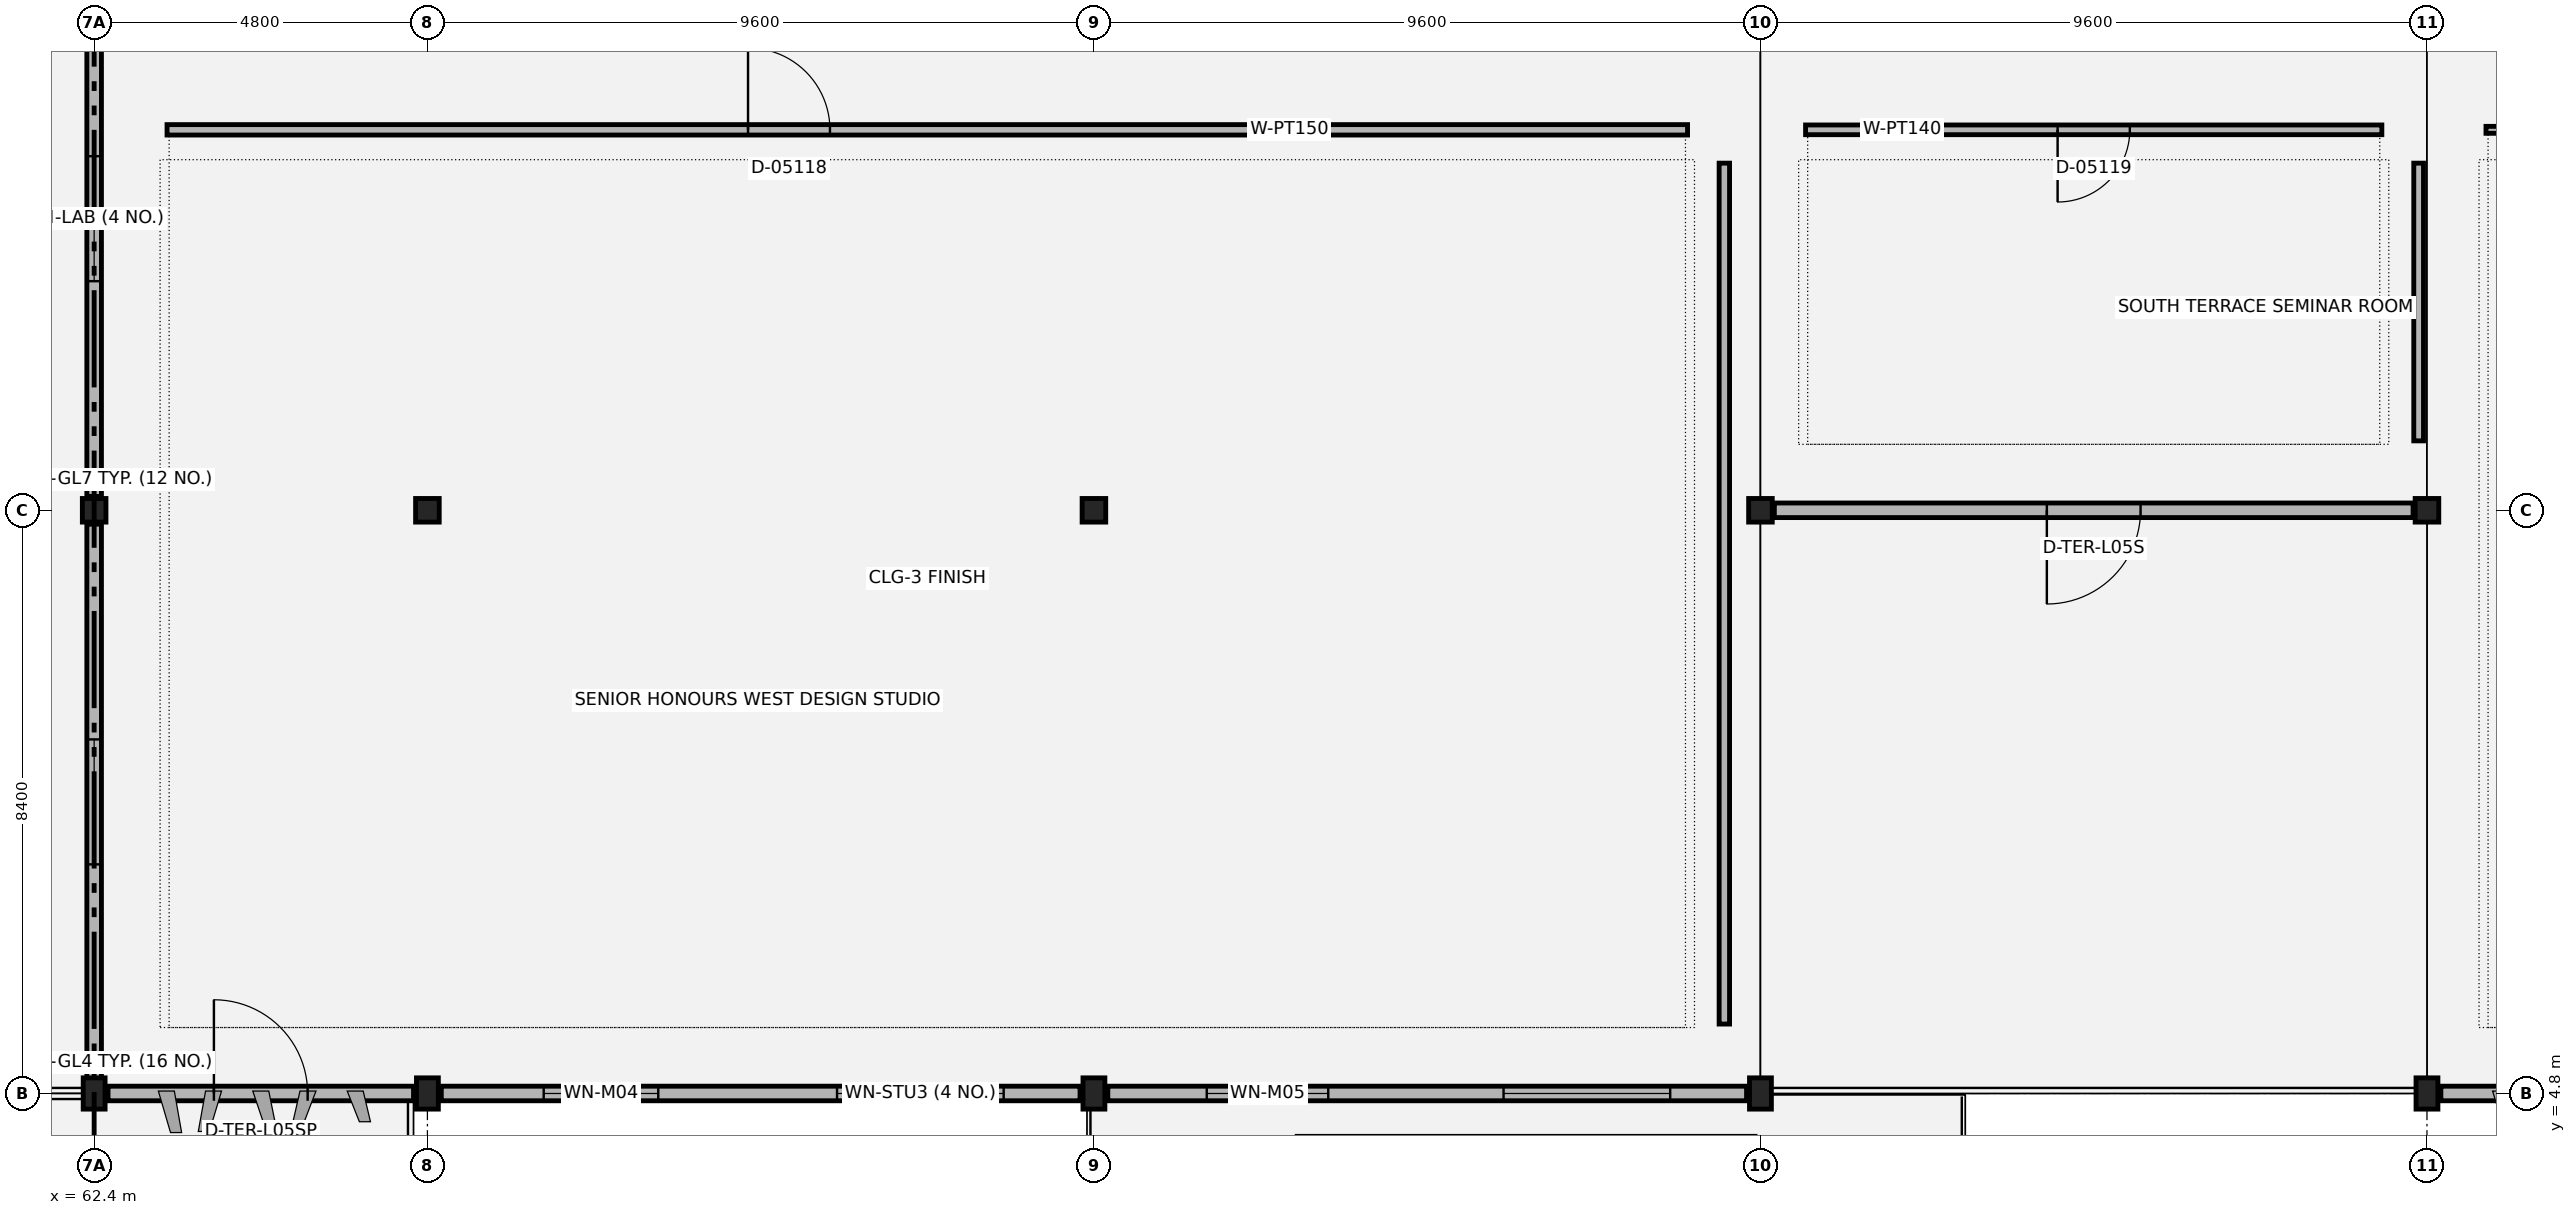
"""IFC4 building model, lengths in metres.
Left out: names, types, materials, properties, quantities, classifications, styles, units other than length and angle.
Written with IfcOpenShell. Run it as: python <this file> out.ifc"""

import sys

from ifc_helpers import new_model, si_unit, direction, frame, frame_2d, origin, origin_2d, place, context, subcontext, project, spatial, rectangle, extrude, element, fill, save


model = new_model("IFC4")
c1 = context("Model", 3, precision=1e-05, world=origin(), true_north=direction((0.0, 1.0)))
c2 = subcontext(c1, "Body", "Model", "MODEL_VIEW")
j1 = project(units=[si_unit("LENGTHUNIT", "METRE"), si_unit("PLANEANGLEUNIT", "RADIAN")], contexts=[c1])
p1 = place(None, origin())
s1 = spatial("IfcSite", under=j1, at=p1, CompositionType="ELEMENT")
p2 = place(p1, origin())
s2 = spatial("IfcBuilding", under=s1, at=p2, CompositionType="ELEMENT")
p3 = place(p2, frame((0.0, 0.0, 22.8)))
s3 = spatial("IfcBuildingStorey", under=s2, at=p3, CompositionType="ELEMENT", Elevation=22.8)
p4 = place(p3, frame((62.4, 4.8, 0.0), z_axis=(0.0, 0.0, 1.0), x_axis=(1.0, 0.0, 0.0)))
e1 = element("IfcColumn", 1, at=p4, inside=s3, PredefinedType="COLUMN", context=c2, shape_type="SweptSolid", body=[
    extrude(rectangle(XDim=0.315, YDim=0.45, at=origin_2d()), origin(), (0.0, 0.0, 1.0), 4.2),
])
p5 = place(p3, frame((62.4, 13.2, 0.0), z_axis=(0.0, 0.0, 1.0), x_axis=(1.0, 0.0, 0.0)))
e2 = element("IfcColumn", 2, at=p5, inside=s3, PredefinedType="COLUMN", context=c2, shape_type="SweptSolid", body=[
    extrude(rectangle(XDim=0.34, YDim=0.34, at=origin_2d()), origin(), (0.0, 0.0, 1.0), 4.2),
])
p6 = place(p3, frame((67.2, 4.8, 0.0), z_axis=(0.0, 0.0, 1.0), x_axis=(1.0, 0.0, 0.0)))
e3 = element("IfcColumn", 3, at=p6, inside=s3, PredefinedType="COLUMN", context=c2, shape_type="SweptSolid", body=[
    extrude(rectangle(XDim=0.315, YDim=0.45, at=origin_2d()), origin(), (0.0, 0.0, 1.0), 4.2),
])
p7 = place(p3, frame((67.2, 13.2, 0.0), z_axis=(0.0, 0.0, 1.0), x_axis=(1.0, 0.0, 0.0)))
e4 = element("IfcColumn", 4, at=p7, inside=s3, PredefinedType="COLUMN", context=c2, shape_type="SweptSolid", body=[
    extrude(rectangle(XDim=0.34, YDim=0.34, at=origin_2d()), origin(), (0.0, 0.0, 1.0), 4.2),
])
p8 = place(p3, frame((76.8, 4.8, 0.0), z_axis=(0.0, 0.0, 1.0), x_axis=(1.0, 0.0, 0.0)))
e5 = element("IfcColumn", 5, at=p8, inside=s3, PredefinedType="COLUMN", context=c2, shape_type="SweptSolid", body=[
    extrude(rectangle(XDim=0.315, YDim=0.45, at=origin_2d()), origin(), (0.0, 0.0, 1.0), 4.2),
])
p9 = place(p3, frame((76.8, 13.2, 0.0), z_axis=(0.0, 0.0, 1.0), x_axis=(1.0, 0.0, 0.0)))
e6 = element("IfcColumn", 6, at=p9, inside=s3, PredefinedType="COLUMN", context=c2, shape_type="SweptSolid", body=[
    extrude(rectangle(XDim=0.34, YDim=0.34, at=origin_2d()), origin(), (0.0, 0.0, 1.0), 4.2),
])
p10 = place(p3, frame((86.4, 4.8, 0.0), z_axis=(0.0, 0.0, 1.0), x_axis=(1.0, 0.0, 0.0)))
e7 = element("IfcColumn", 7, at=p10, inside=s3, PredefinedType="COLUMN", context=c2, shape_type="SweptSolid", body=[
    extrude(rectangle(XDim=0.315, YDim=0.45, at=origin_2d()), origin(), (0.0, 0.0, 1.0), 4.2),
])
p11 = place(p3, frame((86.4, 13.2, 0.0), z_axis=(0.0, 0.0, 1.0), x_axis=(1.0, 0.0, 0.0)))
e8 = element("IfcColumn", 8, at=p11, inside=s3, PredefinedType="COLUMN", context=c2, shape_type="SweptSolid", body=[
    extrude(rectangle(XDim=0.34, YDim=0.34, at=origin_2d()), origin(), (0.0, 0.0, 1.0), 4.2),
])
p12 = place(p3, frame((96.0, 4.8, 0.0), z_axis=(0.0, 0.0, 1.0), x_axis=(1.0, 0.0, 0.0)))
e9 = element("IfcColumn", 9, at=p12, inside=s3, PredefinedType="COLUMN", context=c2, shape_type="SweptSolid", body=[
    extrude(rectangle(XDim=0.315, YDim=0.45, at=origin_2d()), origin(), (0.0, 0.0, 1.0), 4.2),
])
p13 = place(p3, frame((96.0, 13.2, 0.0), z_axis=(0.0, 0.0, 1.0), x_axis=(1.0, 0.0, 0.0)))
e10 = element("IfcColumn", 10, at=p13, inside=s3, PredefinedType="COLUMN", context=c2, shape_type="SweptSolid", body=[
    extrude(rectangle(XDim=0.34, YDim=0.34, at=origin_2d()), origin(), (0.0, 0.0, 1.0), 4.2),
])
p14 = place(p3, frame((62.6, 4.8, 0.0), z_axis=(0.0, 0.0, 1.0), x_axis=(1.0, 0.0, 0.0)))
e11 = element("IfcWall", 11, at=p14, inside=s3, PredefinedType="SOLIDWALL", context=c2, shape_type="SweptSolid", body=[
    extrude(rectangle(XDim=4.4, YDim=0.21, at=frame_2d((2.2, 0.0))), origin(), (0.0, 0.0, 1.0), 3.07),
])
p15 = place(p14, frame((1.525, 0.0, 0.0)))
e12 = element("IfcOpeningElement", 12, at=p15, cuts=e11, PredefinedType="OPENING", context=c2, shape_type="SweptSolid", body=[
    extrude(rectangle(XDim=1.35, YDim=2.15, at=frame_2d((0.675, 1.075))), frame((0.0, 0.115, 0.0), z_axis=(0.0, -1.0, 0.0), x_axis=(1.0, 0.0, 0.0)), (0.0, 0.0, 1.0), 0.23),
])
p16 = place(p3, frame((67.4, 4.8, 0.0), z_axis=(0.0, 0.0, 1.0), x_axis=(1.0, 0.0, 0.0)))
e13 = element("IfcWall", 13, at=p16, inside=s3, PredefinedType="SOLIDWALL", context=c2, shape_type="SweptSolid", body=[
    extrude(rectangle(XDim=9.2, YDim=0.21, at=frame_2d((4.6, 0.0))), origin(), (0.0, 0.0, 1.0), 3.07),
])
p17 = place(p16, frame((1.475, 0.0, 0.9)))
e14 = element("IfcOpeningElement", 14, at=p17, cuts=e13, PredefinedType="OPENING", context=c2, shape_type="SweptSolid", body=[
    extrude(rectangle(XDim=1.65, YDim=1.5, at=frame_2d((0.825, 0.75))), frame((0.0, 0.115, 0.0), z_axis=(0.0, -1.0, 0.0), x_axis=(1.0, 0.0, 0.0)), (0.0, 0.0, 1.0), 0.23),
])
p18 = place(p16, frame((5.7, 0.0, 0.9)))
e15 = element("IfcOpeningElement", 15, at=p18, cuts=e13, PredefinedType="OPENING", context=c2, shape_type="SweptSolid", body=[
    extrude(rectangle(XDim=2.4, YDim=1.6, at=frame_2d((1.2, 0.8))), frame((0.0, 0.115, 0.0), z_axis=(0.0, -1.0, 0.0), x_axis=(1.0, 0.0, 0.0)), (0.0, 0.0, 1.0), 0.23),
])
p19 = place(p3, frame((77.0, 4.8, 0.0), z_axis=(0.0, 0.0, 1.0), x_axis=(1.0, 0.0, 0.0)))
e16 = element("IfcWall", 16, at=p19, inside=s3, PredefinedType="SOLIDWALL", context=c2, shape_type="SweptSolid", body=[
    extrude(rectangle(XDim=9.2, YDim=0.21, at=frame_2d((4.6, 0.0))), origin(), (0.0, 0.0, 1.0), 3.07),
])
p20 = place(p19, frame((1.425, 0.0, 0.9)))
e17 = element("IfcOpeningElement", 17, at=p20, cuts=e16, PredefinedType="OPENING", context=c2, shape_type="SweptSolid", body=[
    extrude(rectangle(XDim=1.75, YDim=1.55, at=frame_2d((0.875, 0.775))), frame((0.0, 0.115, 0.0), z_axis=(0.0, -1.0, 0.0), x_axis=(1.0, 0.0, 0.0)), (0.0, 0.0, 1.0), 0.23),
])
p21 = place(p19, frame((5.7, 0.0, 0.9)))
e18 = element("IfcOpeningElement", 18, at=p21, cuts=e16, PredefinedType="OPENING", context=c2, shape_type="SweptSolid", body=[
    extrude(rectangle(XDim=2.4, YDim=1.6, at=frame_2d((1.2, 0.8))), frame((0.0, 0.115, 0.0), z_axis=(0.0, -1.0, 0.0), x_axis=(1.0, 0.0, 0.0)), (0.0, 0.0, 1.0), 0.23),
])
p22 = place(p3, frame((96.2, 4.8, 0.0), z_axis=(0.0, 0.0, 1.0), x_axis=(1.0, 0.0, 0.0)))
e19 = element("IfcWall", 19, at=p22, inside=s3, PredefinedType="SOLIDWALL", context=c2, shape_type="SweptSolid", body=[
    extrude(rectangle(XDim=9.2, YDim=0.21, at=frame_2d((4.6, 0.0))), origin(), (0.0, 0.0, 1.0), 3.07),
])
p23 = place(p22, frame((1.375, 0.0, 0.9)))
e20 = element("IfcOpeningElement", 20, at=p23, cuts=e19, PredefinedType="OPENING", context=c2, shape_type="SweptSolid", body=[
    extrude(rectangle(XDim=1.85, YDim=1.55, at=frame_2d((0.925, 0.775))), frame((0.0, 0.115, 0.0), z_axis=(0.0, -1.0, 0.0), x_axis=(1.0, 0.0, 0.0)), (0.0, 0.0, 1.0), 0.23),
])
p24 = place(p22, frame((5.7, 0.0, 0.9)))
e21 = element("IfcOpeningElement", 21, at=p24, cuts=e19, PredefinedType="OPENING", context=c2, shape_type="SweptSolid", body=[
    extrude(rectangle(XDim=2.4, YDim=1.6, at=frame_2d((1.2, 0.8))), frame((0.0, 0.115, 0.0), z_axis=(0.0, -1.0, 0.0), x_axis=(1.0, 0.0, 0.0)), (0.0, 0.0, 1.0), 0.23),
])
p25 = place(p3, frame((62.4, 21.4, 0.0), z_axis=(0.0, 0.0, 1.0), x_axis=(0.0, -1.0, 0.0)))
e22 = element("IfcWall", 22, at=p25, inside=s3, PredefinedType="SOLIDWALL", context=c2, shape_type="SweptSolid", body=[
    extrude(rectangle(XDim=8.0, YDim=0.21, at=frame_2d((4.0, 0.0))), origin(), (0.0, 0.0, 1.0), 3.07),
])
p26 = place(p25, frame((3.1, 0.0, 0.9)))
e23 = element("IfcOpeningElement", 23, at=p26, cuts=e22, PredefinedType="OPENING", context=c2, shape_type="SweptSolid", body=[
    extrude(rectangle(XDim=1.8, YDim=1.5, at=frame_2d((0.9, 0.75))), frame((0.0, 0.115, 0.0), z_axis=(0.0, -1.0, 0.0), x_axis=(1.0, 0.0, 0.0)), (0.0, 0.0, 1.0), 0.23),
])
p27 = place(p3, frame((62.4, 13.0, 0.0), z_axis=(0.0, 0.0, 1.0), x_axis=(0.0, -1.0, 0.0)))
e24 = element("IfcWall", 24, at=p27, inside=s3, PredefinedType="SOLIDWALL", context=c2, shape_type="SweptSolid", body=[
    extrude(rectangle(XDim=8.0, YDim=0.21, at=frame_2d((4.0, 0.0))), origin(), (0.0, 0.0, 1.0), 3.07),
])
p28 = place(p27, frame((3.1, 0.0, 0.9)))
e25 = element("IfcOpeningElement", 25, at=p28, cuts=e24, PredefinedType="OPENING", context=c2, shape_type="SweptSolid", body=[
    extrude(rectangle(XDim=1.8, YDim=1.5, at=frame_2d((0.9, 0.75))), frame((0.0, 0.115, 0.0), z_axis=(0.0, -1.0, 0.0), x_axis=(1.0, 0.0, 0.0)), (0.0, 0.0, 1.0), 0.23),
])
p29 = place(p3, frame((86.6, 13.2, 0.0), z_axis=(0.0, 0.0, 1.0), x_axis=(1.0, 0.0, 0.0)))
e26 = element("IfcWall", 26, at=p29, inside=s3, PredefinedType="SOLIDWALL", context=c2, shape_type="SweptSolid", body=[
    extrude(rectangle(XDim=9.2, YDim=0.21, at=frame_2d((4.6, 0.0))), origin(), (0.0, 0.0, 1.0), 3.07),
])
p30 = place(p29, frame((3.925, 0.0, 0.0)))
e27 = element("IfcOpeningElement", 27, at=p30, cuts=e26, PredefinedType="OPENING", context=c2, shape_type="SweptSolid", body=[
    extrude(rectangle(XDim=1.35, YDim=2.15, at=frame_2d((0.675, 1.075))), frame((0.0, 0.115, 0.0), z_axis=(0.0, -1.0, 0.0), x_axis=(1.0, 0.0, 0.0)), (0.0, 0.0, 1.0), 0.23),
])
p31 = place(p3, frame((63.45, 18.68, 0.0), z_axis=(0.0, 0.0, 1.0), x_axis=(1.0, 0.0, 0.0)))
e28 = element("IfcWall", 28, at=p31, inside=s3, PredefinedType="PARTITIONING", context=c2, shape_type="SweptSolid", body=[
    extrude(rectangle(XDim=21.9, YDim=0.15, at=frame_2d((10.95, 0.0))), origin(), (0.0, 0.0, 1.0), 3.05),
])
p32 = place(p31, frame((8.368, 0.0, 0.0)))
e29 = element("IfcOpeningElement", 29, at=p32, cuts=e28, PredefinedType="OPENING", context=c2, shape_type="SweptSolid", body=[
    extrude(rectangle(XDim=1.18, YDim=2.15, at=frame_2d((0.59, 1.075))), frame((0.0, 0.085, 0.0), z_axis=(0.0, -1.0, 0.0), x_axis=(1.0, 0.0, 0.0)), (0.0, 0.0, 1.0), 0.17),
])
p33 = place(p3, frame((85.88, 5.8, 0.0), z_axis=(0.0, 0.0, 1.0), x_axis=(0.0, 1.0, 0.0)))
e30 = element("IfcWall", 30, at=p33, inside=s3, PredefinedType="PARTITIONING", context=c2, shape_type="SweptSolid", body=[
    extrude(rectangle(XDim=12.4, YDim=0.15, at=frame_2d((6.2, 0.0))), origin(), (0.0, 0.0, 1.0), 3.05),
])
p34 = place(p3, frame((87.05, 18.68, 0.0), z_axis=(0.0, 0.0, 1.0), x_axis=(1.0, 0.0, 0.0)))
e31 = element("IfcWall", 31, at=p34, inside=s3, PredefinedType="PARTITIONING", context=c2, shape_type="SweptSolid", body=[
    extrude(rectangle(XDim=8.3, YDim=0.14, at=frame_2d((4.15, 0.0))), origin(), (0.0, 0.0, 1.0), 3.05),
])
p35 = place(p34, frame((3.63, 0.0, 0.0)))
e32 = element("IfcOpeningElement", 32, at=p35, cuts=e31, PredefinedType="OPENING", context=c2, shape_type="SweptSolid", body=[
    extrude(rectangle(XDim=1.04, YDim=2.15, at=frame_2d((0.52, 1.075))), frame((0.0, 0.08, 0.0), z_axis=(0.0, -1.0, 0.0), x_axis=(1.0, 0.0, 0.0)), (0.0, 0.0, 1.0), 0.16),
])
p36 = place(p3, frame((95.88, 14.2, 0.0), z_axis=(0.0, 0.0, 1.0), x_axis=(0.0, 1.0, 0.0)))
e33 = element("IfcWall", 33, at=p36, inside=s3, PredefinedType="PARTITIONING", context=c2, shape_type="SweptSolid", body=[
    extrude(rectangle(XDim=4.0, YDim=0.14, at=frame_2d((2.0, 0.0))), origin(), (0.0, 0.0, 1.0), 3.05),
])
p37 = place(p3, frame((96.85, 18.68, 0.0), z_axis=(0.0, 0.0, 1.0), x_axis=(1.0, 0.0, 0.0)))
e34 = element("IfcWall", 34, at=p37, inside=s3, PredefinedType="MOVABLE", context=c2, shape_type="SweptSolid", body=[
    extrude(rectangle(XDim=22.1, YDim=0.1, at=frame_2d((11.05, 0.0))), origin(), (0.0, 0.0, 1.0), 3.05),
])
p38 = place(p37, frame((3.418, 0.0, 0.0)))
e35 = element("IfcOpeningElement", 35, at=p38, cuts=e34, PredefinedType="OPENING", context=c2, shape_type="SweptSolid", body=[
    extrude(rectangle(XDim=1.18, YDim=2.15, at=frame_2d((0.59, 1.075))), frame((0.0, 0.06, 0.0), z_axis=(0.0, -1.0, 0.0), x_axis=(1.0, 0.0, 0.0)), (0.0, 0.0, 1.0), 0.12),
])
p39 = place(p15, origin())
e36 = element("IfcDoor", 36, at=p39, inside=s3, OperationType="SINGLE_SWING_LEFT", PredefinedType="DOOR", context=c2, shape_type="SweptSolid", body=[
    extrude(rectangle(XDim=1.35, YDim=2.15, at=frame_2d((0.675, 1.075))), frame((0.0, 0.025, 0.0), z_axis=(0.0, -1.0, 0.0), x_axis=(1.0, 0.0, 0.0)), (0.0, 0.0, 1.0), 0.05),
])
fill(e12, e36)
p40 = place(p17, origin())
e37 = element("IfcWindow", 37, at=p40, inside=s3, PartitioningType="SINGLE_PANEL", PredefinedType="WINDOW", context=c2, shape_type="SweptSolid", body=[
    extrude(rectangle(XDim=1.65, YDim=1.5, at=frame_2d((0.825, 0.75))), frame((0.0, 0.03, 0.0), z_axis=(0.0, -1.0, 0.0), x_axis=(1.0, 0.0, 0.0)), (0.0, 0.0, 1.0), 0.06),
])
fill(e14, e37)
p41 = place(p18, origin())
e38 = element("IfcWindow", 38, at=p41, inside=s3, PartitioningType="SINGLE_PANEL", PredefinedType="WINDOW", context=c2, shape_type="SweptSolid", body=[
    extrude(rectangle(XDim=2.4, YDim=1.6, at=frame_2d((1.2, 0.8))), frame((0.0, 0.03, 0.0), z_axis=(0.0, -1.0, 0.0), x_axis=(1.0, 0.0, 0.0)), (0.0, 0.0, 1.0), 0.06),
])
fill(e15, e38)
p42 = place(p20, origin())
e39 = element("IfcWindow", 39, at=p42, inside=s3, PartitioningType="SINGLE_PANEL", PredefinedType="WINDOW", context=c2, shape_type="SweptSolid", body=[
    extrude(rectangle(XDim=1.75, YDim=1.55, at=frame_2d((0.875, 0.775))), frame((0.0, 0.03, 0.0), z_axis=(0.0, -1.0, 0.0), x_axis=(1.0, 0.0, 0.0)), (0.0, 0.0, 1.0), 0.06),
])
fill(e17, e39)
p43 = place(p21, origin())
e40 = element("IfcWindow", 40, at=p43, inside=s3, PartitioningType="SINGLE_PANEL", PredefinedType="WINDOW", context=c2, shape_type="SweptSolid", body=[
    extrude(rectangle(XDim=2.4, YDim=1.6, at=frame_2d((1.2, 0.8))), frame((0.0, 0.03, 0.0), z_axis=(0.0, -1.0, 0.0), x_axis=(1.0, 0.0, 0.0)), (0.0, 0.0, 1.0), 0.06),
])
fill(e18, e40)
p44 = place(p26, origin())
e41 = element("IfcWindow", 41, at=p44, inside=s3, PartitioningType="SINGLE_PANEL", PredefinedType="WINDOW", context=c2, shape_type="SweptSolid", body=[
    extrude(rectangle(XDim=1.8, YDim=1.5, at=frame_2d((0.9, 0.75))), frame((0.0, 0.03, 0.0), z_axis=(0.0, -1.0, 0.0), x_axis=(1.0, 0.0, 0.0)), (0.0, 0.0, 1.0), 0.06),
])
fill(e23, e41)
p45 = place(p28, origin())
e42 = element("IfcWindow", 42, at=p45, inside=s3, PartitioningType="SINGLE_PANEL", PredefinedType="WINDOW", context=c2, shape_type="SweptSolid", body=[
    extrude(rectangle(XDim=1.8, YDim=1.5, at=frame_2d((0.9, 0.75))), frame((0.0, 0.03, 0.0), z_axis=(0.0, -1.0, 0.0), x_axis=(1.0, 0.0, 0.0)), (0.0, 0.0, 1.0), 0.06),
])
fill(e25, e42)
p46 = place(p30, origin())
e43 = element("IfcDoor", 43, at=p46, inside=s3, OperationType="SINGLE_SWING_RIGHT", PredefinedType="DOOR", context=c2, shape_type="SweptSolid", body=[
    extrude(rectangle(XDim=1.35, YDim=2.15, at=frame_2d((0.675, 1.075))), frame((0.0, 0.025, 0.0), z_axis=(0.0, -1.0, 0.0), x_axis=(1.0, 0.0, 0.0)), (0.0, 0.0, 1.0), 0.05),
])
fill(e27, e43)
p47 = place(p32, origin())
e44 = element("IfcDoor", 44, at=p47, inside=s3, OperationType="SINGLE_SWING_LEFT", PredefinedType="DOOR", context=c2, shape_type="SweptSolid", body=[
    extrude(rectangle(XDim=1.18, YDim=2.15, at=frame_2d((0.59, 1.075))), frame((0.0, 0.025, 0.0), z_axis=(0.0, -1.0, 0.0), x_axis=(1.0, 0.0, 0.0)), (0.0, 0.0, 1.0), 0.05),
])
fill(e29, e44)
p48 = place(p35, origin())
e45 = element("IfcDoor", 45, at=p48, inside=s3, OperationType="SINGLE_SWING_RIGHT", PredefinedType="DOOR", context=c2, shape_type="SweptSolid", body=[
    extrude(rectangle(XDim=1.04, YDim=2.15, at=frame_2d((0.52, 1.075))), frame((0.0, 0.025, 0.0), z_axis=(0.0, -1.0, 0.0), x_axis=(1.0, 0.0, 0.0)), (0.0, 0.0, 1.0), 0.05),
])
fill(e32, e45)
save(model, sys.argv[1])
